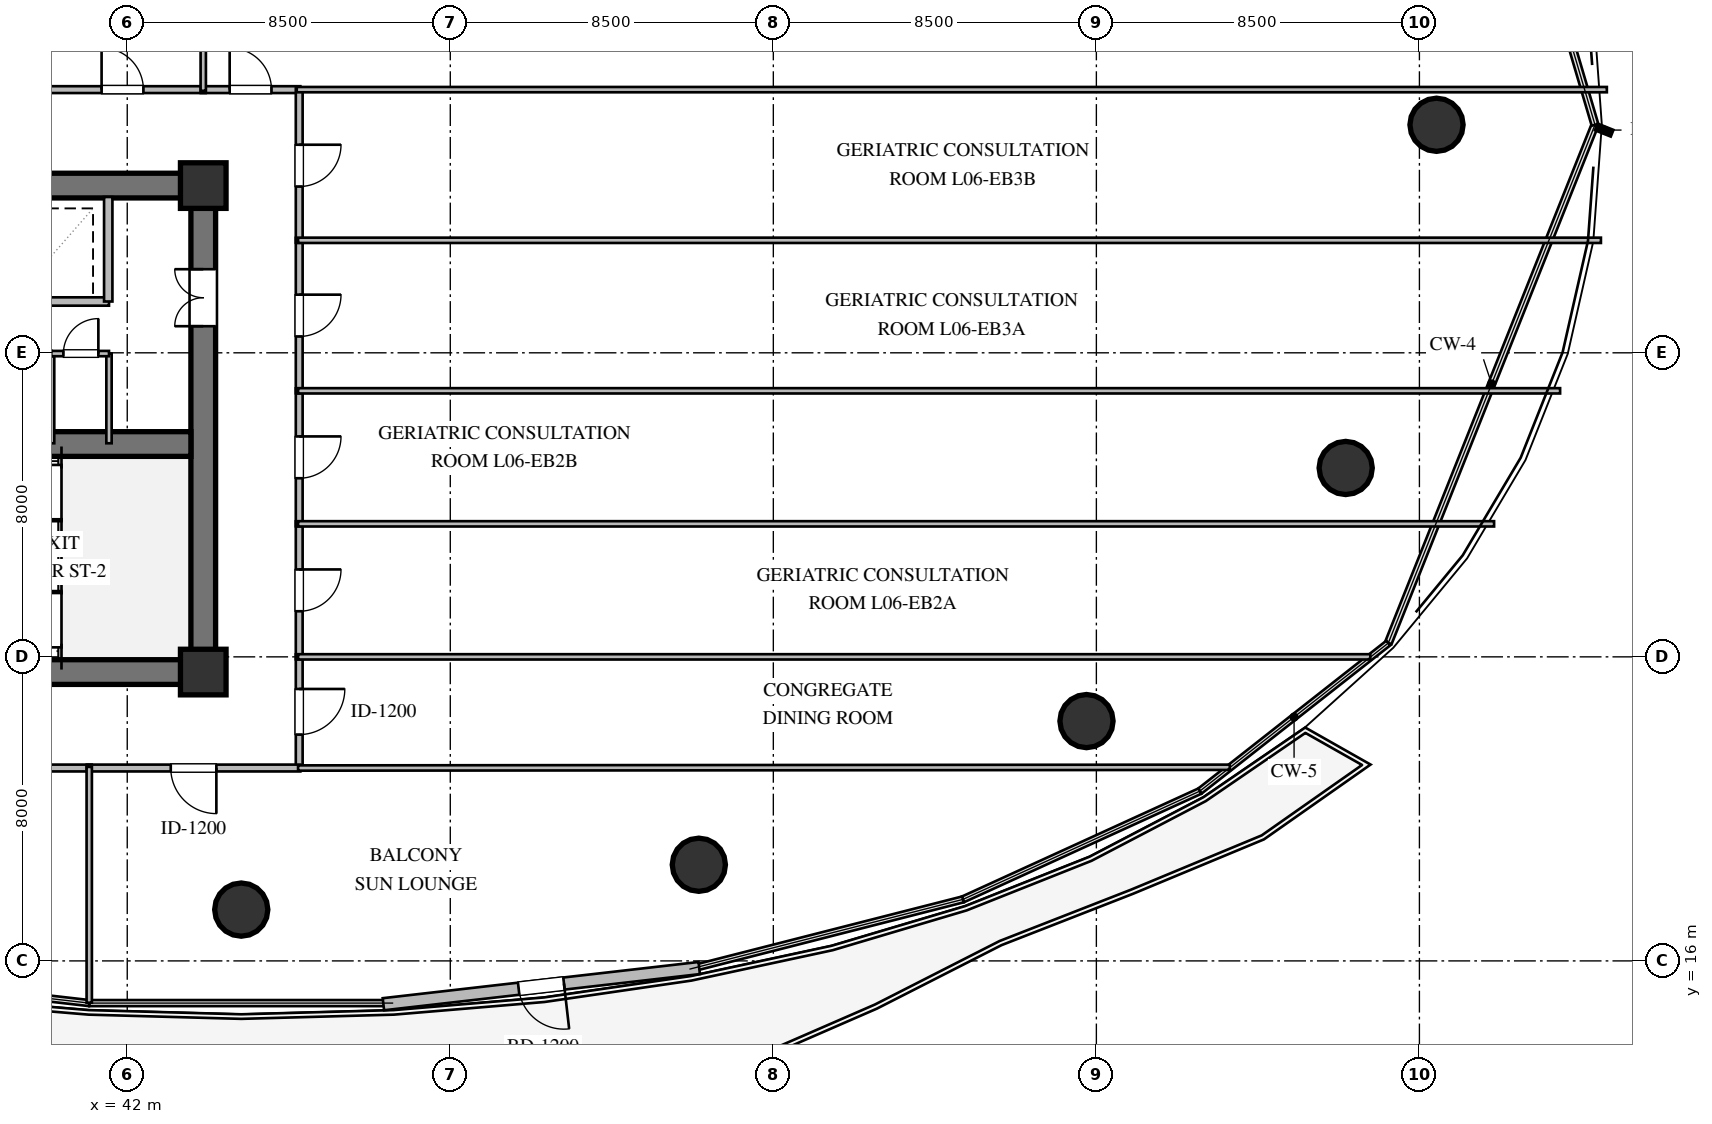
"""IFC4 building model, lengths in metres.
Left out: names, types, materials, properties, quantities, classifications, styles, units other than length and angle.
Written with IfcOpenShell. Run it as: python <this file> out.ifc"""

import sys

from ifc_helpers import new_model, si_unit, direction, frame, frame_2d, origin, origin_2d, place, context, subcontext, project, spatial, rectangle, circle, extrude, element, fill, save


model = new_model("IFC4")
c1 = context("Model", 3, precision=1e-05, world=origin(), true_north=direction((0.0, 1.0)))
c2 = subcontext(c1, "Body", "Model", "MODEL_VIEW")
j1 = project(units=[si_unit("LENGTHUNIT", "METRE"), si_unit("PLANEANGLEUNIT", "RADIAN")], contexts=[c1])
p1 = place(None, origin())
s1 = spatial("IfcSite", under=j1, at=p1, CompositionType="ELEMENT")
p2 = place(p1, origin())
s2 = spatial("IfcBuilding", under=s1, at=p2, CompositionType="ELEMENT")
p3 = place(p2, frame((0.0, 0.0, 27.6)))
s3 = spatial("IfcBuildingStorey", under=s2, at=p3, CompositionType="ELEMENT", Elevation=27.6)
for number, where, z_axis, x_axis in (
    (1, (21.675, 23.6, 0.0), (0.0, 0.0, 1.0), (1.0, 0.0, 0.0)),
    (2, (21.675, 36.4, 0.0), (0.0, 0.0, 1.0), (1.0, 0.0, 0.0)),
):
    element("IfcWall", number, at=place(p3, frame(where, z_axis=z_axis, x_axis=x_axis)), inside=s3, PredefinedType="SHEAR", context=c2, shape_type="SweptSolid", body=[
        extrude(rectangle(XDim=22.65, YDim=0.65, at=frame_2d((11.325, 0.0))), origin(), (0.0, 0.0, 1.0), 3.36),
    ])
p4 = place(p3, frame((44.0, 23.925, 0.0), z_axis=(0.0, 0.0, 1.0), x_axis=(0.0, 1.0, 0.0)))
e3 = element("IfcWall", 3, at=p4, inside=s3, PredefinedType="SHEAR", context=c2, shape_type="SweptSolid", body=[
    extrude(rectangle(XDim=12.15, YDim=0.65, at=frame_2d((6.075, 0.0))), origin(), (0.0, 0.0, 1.0), 3.36),
])
p5 = place(p4, frame((8.775, 0.0, 0.0)))
e4 = element("IfcOpeningElement", 4, at=p5, cuts=e3, PredefinedType="OPENING", context=c2, shape_type="SweptSolid", body=[
    extrude(rectangle(XDim=1.5, YDim=2.15, at=frame_2d((0.75, 1.075))), frame((0.0, 0.335, 0.0), z_axis=(0.0, -1.0, 0.0), x_axis=(1.0, 0.0, 0.0)), (0.0, 0.0, 1.0), 0.67),
])
p6 = place(p3, frame((22.325, 29.6, 0.0), z_axis=(0.0, 0.0, 1.0), x_axis=(1.0, 0.0, 0.0)))
e5 = element("IfcWall", 5, at=p6, inside=s3, PredefinedType="SHEAR", context=c2, shape_type="SweptSolid", body=[
    extrude(rectangle(XDim=21.35, YDim=0.65, at=frame_2d((10.675, 0.0))), origin(), (0.0, 0.0, 1.0), 3.36),
])
p7 = place(p6, frame((12.125, 0.0, 0.0)))
e6 = element("IfcOpeningElement", 6, at=p7, cuts=e5, PredefinedType="OPENING", context=c2, shape_type="SweptSolid", body=[
    extrude(rectangle(XDim=1.15, YDim=2.1, at=frame_2d((0.575, 1.05))), frame((0.0, 0.335, 0.0), z_axis=(0.0, -1.0, 0.0), x_axis=(1.0, 0.0, 0.0)), (0.0, 0.0, 1.0), 0.67),
])
for number, where, z_axis, x_axis in (
    (7, (44.0, 23.6, 0.0), (0.0, 0.0, 1.0), (1.0, 0.0, 0.0)),
    (8, (44.0, 36.4, 0.0), (0.0, 0.0, 1.0), (1.0, 0.0, 0.0)),
):
    element("IfcColumn", number, at=place(p3, frame(where, z_axis=z_axis, x_axis=x_axis)), inside=s3, PredefinedType="COLUMN", context=c2, shape_type="SweptSolid", body=[
        extrude(rectangle(XDim=1.2, YDim=1.2, at=origin_2d()), origin(), (0.0, 0.0, 1.0), 3.6),
    ])
for number, where, z_axis, x_axis in (
    (9, (76.45, 38.0, 0.0), (0.0, 0.0, 1.0), (1.0, 0.0, 0.0)),
    (10, (45.0, 17.35, 0.0), (0.0, 0.0, 1.0), (1.0, 0.0, 0.0)),
    (11, (57.04, 18.53, 0.0), (0.0, 0.0, 1.0), (1.0, 0.0, 0.0)),
    (12, (67.24, 22.31, 0.0), (0.0, 0.0, 1.0), (1.0, 0.0, 0.0)),
    (13, (74.06, 28.97, 0.0), (0.0, 0.0, 1.0), (1.0, 0.0, 0.0)),
):
    element("IfcColumn", number, at=place(p3, frame(where, z_axis=z_axis, x_axis=x_axis)), inside=s3, PredefinedType="COLUMN", context=c2, shape_type="SweptSolid", body=[
        extrude(circle(Radius=0.7, at=origin_2d()), origin(), (0.0, 0.0, 1.0), 3.6),
    ])
p8 = place(p3, frame((57.05, 15.812, 0.0), z_axis=(0.0, 0.0, 1.0), x_axis=(-0.993503192468, -0.113804246649, 0.0)))
e14 = element("IfcWall", 14, at=p8, inside=s3, PredefinedType="STANDARD", context=c2, shape_type="SweptSolid", body=[
    extrude(rectangle(XDim=8.365, YDim=0.32, at=frame_2d((4.182, 0.0))), origin(), (0.0, 0.0, 1.0), 3.36),
])
p9 = place(p8, frame((3.582, 0.0, 0.0)))
e15 = element("IfcOpeningElement", 15, at=p9, cuts=e14, PredefinedType="OPENING", context=c2, shape_type="SweptSolid", body=[
    extrude(rectangle(XDim=1.2, YDim=2.15, at=frame_2d((0.6, 1.075))), frame((0.0, 0.17, 0.0), z_axis=(0.0, -1.0, 0.0), x_axis=(1.0, 0.0, 0.0)), (0.0, 0.0, 1.0), 0.34),
])
p10 = place(p3, frame((33.98, 33.35, 0.0), z_axis=(0.0, 0.0, 1.0), x_axis=(1.0, 0.0, 0.0)))
e16 = element("IfcWall", 16, at=p10, inside=s3, PredefinedType="SOLIDWALL", context=c2, shape_type="SweptSolid", body=[
    extrude(rectangle(XDim=7.54, YDim=0.22, at=frame_2d((3.77, 0.0))), origin(), (0.0, 0.0, 1.0), 3.36),
])
p11 = place(p3, frame((41.5, 33.35, 0.0), z_axis=(0.0, 0.0, 1.0), x_axis=(0.0, 1.0, 0.0)))
e17 = element("IfcWall", 17, at=p11, inside=s3, PredefinedType="SOLIDWALL", context=c2, shape_type="SweptSolid", body=[
    extrude(rectangle(XDim=2.75, YDim=0.22, at=frame_2d((1.375, 0.0))), origin(), (0.0, 0.0, 1.0), 3.36),
])
p12 = place(p3, frame((40.0, 29.62, 0.0), z_axis=(0.0, 0.0, 1.0), x_axis=(0.0, 1.0, 0.0)))
e18 = element("IfcWall", 18, at=p12, inside=s3, PredefinedType="PLUMBINGWALL", context=c2, shape_type="SweptSolid", body=[
    extrude(rectangle(XDim=2.36, YDim=0.16, at=frame_2d((1.18, 0.0))), origin(), (0.0, 0.0, 1.0), 3.36),
])
p13 = place(p3, frame((41.52, 29.62, 0.0), z_axis=(0.0, 0.0, 1.0), x_axis=(0.0, 1.0, 0.0)))
e19 = element("IfcWall", 19, at=p13, inside=s3, PredefinedType="PARTITIONING", context=c2, shape_type="SweptSolid", body=[
    extrude(rectangle(XDim=2.36, YDim=0.14, at=frame_2d((1.18, 0.0))), origin(), (0.0, 0.0, 1.0), 3.36),
])
p14 = place(p3, frame((40.0, 31.98, 0.0), z_axis=(0.0, 0.0, 1.0), x_axis=(1.0, 0.0, 0.0)))
e20 = element("IfcWall", 20, at=p14, inside=s3, PredefinedType="PARTITIONING", context=c2, shape_type="SweptSolid", body=[
    extrude(rectangle(XDim=1.52, YDim=0.14, at=frame_2d((0.76, 0.0))), origin(), (0.0, 0.0, 1.0), 3.36),
])
p15 = place(p14, frame((0.32, 0.0, 0.0)))
e21 = element("IfcOpeningElement", 21, at=p15, cuts=e20, PredefinedType="OPENING", context=c2, shape_type="SweptSolid", body=[
    extrude(rectangle(XDim=0.92, YDim=2.1, at=frame_2d((0.46, 1.05))), frame((0.0, 0.08, 0.0), z_axis=(0.0, -1.0, 0.0), x_axis=(1.0, 0.0, 0.0)), (0.0, 0.0, 1.0), 0.16),
])
p16 = place(p3, frame((39.685, 38.925, 0.0), z_axis=(0.0, 0.0, 1.0), x_axis=(1.0, 0.0, 0.0)))
e22 = element("IfcWall", 22, at=p16, inside=s3, PredefinedType="PARTITIONING", context=c2, shape_type="SweptSolid", body=[
    extrude(rectangle(XDim=4.38, YDim=0.18, at=frame_2d((2.19, 0.0))), origin(), (0.0, 0.0, 1.0), 3.36),
])
p17 = place(p16, frame((1.64, 0.0, 0.0)))
e23 = element("IfcOpeningElement", 23, at=p17, cuts=e22, PredefinedType="OPENING", context=c2, shape_type="SweptSolid", body=[
    extrude(rectangle(XDim=1.1, YDim=2.1, at=frame_2d((0.55, 1.05))), frame((0.0, 0.1, 0.0), z_axis=(0.0, -1.0, 0.0), x_axis=(1.0, 0.0, 0.0)), (0.0, 0.0, 1.0), 0.2),
])
p18 = place(p3, frame((43.935, 38.925, 0.0), z_axis=(0.0, 0.0, 1.0), x_axis=(1.0, 0.0, 0.0)))
e24 = element("IfcWall", 24, at=p18, inside=s3, PredefinedType="PARTITIONING", context=c2, shape_type="SweptSolid", body=[
    extrude(rectangle(XDim=2.62, YDim=0.18, at=frame_2d((1.31, 0.0))), origin(), (0.0, 0.0, 1.0), 3.36),
])
p19 = place(p18, frame((0.76, 0.0, 0.0)))
e25 = element("IfcOpeningElement", 25, at=p19, cuts=e24, PredefinedType="OPENING", context=c2, shape_type="SweptSolid", body=[
    extrude(rectangle(XDim=1.1, YDim=2.1, at=frame_2d((0.55, 1.05))), frame((0.0, 0.1, 0.0), z_axis=(0.0, -1.0, 0.0), x_axis=(1.0, 0.0, 0.0)), (0.0, 0.0, 1.0), 0.2),
])
p20 = place(p3, frame((46.525, 24.065, 0.0), z_axis=(0.0, 0.0, 1.0), x_axis=(0.0, -1.0, 0.0)))
e26 = element("IfcWall", 26, at=p20, inside=s3, PredefinedType="PARTITIONING", context=c2, shape_type="SweptSolid", body=[
    extrude(rectangle(XDim=3.02, YDim=0.18, at=frame_2d((1.51, 0.0))), origin(), (0.0, 0.0, 1.0), 3.36),
])
p21 = place(p20, frame((0.91, 0.0, 0.0)))
e27 = element("IfcOpeningElement", 27, at=p21, cuts=e26, PredefinedType="OPENING", context=c2, shape_type="SweptSolid", body=[
    extrude(rectangle(XDim=1.2, YDim=2.15, at=frame_2d((0.6, 1.075))), frame((0.0, 0.1, 0.0), z_axis=(0.0, -1.0, 0.0), x_axis=(1.0, 0.0, 0.0)), (0.0, 0.0, 1.0), 0.2),
])
p22 = place(p3, frame((46.525, 27.565, 0.0), z_axis=(0.0, 0.0, 1.0), x_axis=(0.0, -1.0, 0.0)))
e28 = element("IfcWall", 28, at=p22, inside=s3, PredefinedType="PARTITIONING", context=c2, shape_type="SweptSolid", body=[
    extrude(rectangle(XDim=3.63, YDim=0.18, at=frame_2d((1.815, 0.0))), origin(), (0.0, 0.0, 1.0), 3.36),
])
p23 = place(p22, frame((1.265, 0.0, 0.0)))
e29 = element("IfcOpeningElement", 29, at=p23, cuts=e28, PredefinedType="OPENING", context=c2, shape_type="SweptSolid", body=[
    extrude(rectangle(XDim=1.1, YDim=2.1, at=frame_2d((0.55, 1.05))), frame((0.0, 0.1, 0.0), z_axis=(0.0, -1.0, 0.0), x_axis=(1.0, 0.0, 0.0)), (0.0, 0.0, 1.0), 0.2),
])
p24 = place(p3, frame((46.525, 31.065, 0.0), z_axis=(0.0, 0.0, 1.0), x_axis=(0.0, -1.0, 0.0)))
e30 = element("IfcWall", 30, at=p24, inside=s3, PredefinedType="PARTITIONING", context=c2, shape_type="SweptSolid", body=[
    extrude(rectangle(XDim=3.63, YDim=0.18, at=frame_2d((1.815, 0.0))), origin(), (0.0, 0.0, 1.0), 3.36),
])
p25 = place(p24, frame((1.265, 0.0, 0.0)))
e31 = element("IfcOpeningElement", 31, at=p25, cuts=e30, PredefinedType="OPENING", context=c2, shape_type="SweptSolid", body=[
    extrude(rectangle(XDim=1.1, YDim=2.1, at=frame_2d((0.55, 1.05))), frame((0.0, 0.1, 0.0), z_axis=(0.0, -1.0, 0.0), x_axis=(1.0, 0.0, 0.0)), (0.0, 0.0, 1.0), 0.2),
])
p26 = place(p3, frame((46.525, 35.025, 0.0), z_axis=(0.0, 0.0, 1.0), x_axis=(0.0, -1.0, 0.0)))
e32 = element("IfcWall", 32, at=p26, inside=s3, PredefinedType="PARTITIONING", context=c2, shape_type="SweptSolid", body=[
    extrude(rectangle(XDim=4.09, YDim=0.18, at=frame_2d((2.045, 0.0))), origin(), (0.0, 0.0, 1.0), 3.36),
])
p27 = place(p26, frame((1.495, 0.0, 0.0)))
e33 = element("IfcOpeningElement", 33, at=p27, cuts=e32, PredefinedType="OPENING", context=c2, shape_type="SweptSolid", body=[
    extrude(rectangle(XDim=1.1, YDim=2.1, at=frame_2d((0.55, 1.05))), frame((0.0, 0.1, 0.0), z_axis=(0.0, -1.0, 0.0), x_axis=(1.0, 0.0, 0.0)), (0.0, 0.0, 1.0), 0.2),
])
p28 = place(p3, frame((46.525, 38.955, 0.0), z_axis=(0.0, 0.0, 1.0), x_axis=(0.0, -1.0, 0.0)))
e34 = element("IfcWall", 34, at=p28, inside=s3, PredefinedType="PARTITIONING", context=c2, shape_type="SweptSolid", body=[
    extrude(rectangle(XDim=4.06, YDim=0.18, at=frame_2d((2.03, 0.0))), origin(), (0.0, 0.0, 1.0), 3.36),
])
p29 = place(p28, frame((1.48, 0.0, 0.0)))
e35 = element("IfcOpeningElement", 35, at=p29, cuts=e34, PredefinedType="OPENING", context=c2, shape_type="SweptSolid", body=[
    extrude(rectangle(XDim=1.1, YDim=2.1, at=frame_2d((0.55, 1.05))), frame((0.0, 0.1, 0.0), z_axis=(0.0, -1.0, 0.0), x_axis=(1.0, 0.0, 0.0)), (0.0, 0.0, 1.0), 0.2),
])
p30 = place(p3, frame((41.065, 21.075, 0.0), z_axis=(0.0, 0.0, 1.0), x_axis=(-1.0, 0.0, 0.0)))
e36 = element("IfcWall", 36, at=p30, inside=s3, PredefinedType="PARTITIONING", context=c2, shape_type="SweptSolid", body=[
    extrude(rectangle(XDim=7.13, YDim=0.18, at=frame_2d((3.565, 0.0))), origin(), (0.0, 0.0, 1.0), 2.996),
])
p31 = place(p30, frame((3.015, 0.0, 0.0)))
e37 = element("IfcOpeningElement", 37, at=p31, cuts=e36, PredefinedType="OPENING", context=c2, shape_type="SweptSolid", body=[
    extrude(rectangle(XDim=1.1, YDim=2.1, at=frame_2d((0.55, 1.05))), frame((0.0, 0.1, 0.0), z_axis=(0.0, -1.0, 0.0), x_axis=(1.0, 0.0, 0.0)), (0.0, 0.0, 1.0), 0.2),
])
p32 = place(p3, frame((46.555, 21.075, 0.0), z_axis=(0.0, 0.0, 1.0), x_axis=(-1.0, 0.0, 0.0)))
e38 = element("IfcWall", 38, at=p32, inside=s3, PredefinedType="PARTITIONING", context=c2, shape_type="SweptSolid", body=[
    extrude(rectangle(XDim=5.62, YDim=0.18, at=frame_2d((2.81, 0.0))), origin(), (0.0, 0.0, 1.0), 3.36),
])
p33 = place(p32, frame((2.21, 0.0, 0.0)))
e39 = element("IfcOpeningElement", 39, at=p33, cuts=e38, PredefinedType="OPENING", context=c2, shape_type="SweptSolid", body=[
    extrude(rectangle(XDim=1.2, YDim=2.15, at=frame_2d((0.6, 1.075))), frame((0.0, 0.1, 0.0), z_axis=(0.0, -1.0, 0.0), x_axis=(1.0, 0.0, 0.0)), (0.0, 0.0, 1.0), 0.2),
])
p34 = place(p3, frame((44.0, 67.706, 0.0), z_axis=(0.0, 0.0, 1.0), x_axis=(0.0, -1.0, 0.0)))
e40 = element("IfcWall", 40, at=p34, inside=s3, PredefinedType="PARTITIONING", context=c2, shape_type="SweptSolid", body=[
    extrude(rectangle(XDim=28.811, YDim=0.14, at=frame_2d((14.406, 0.0))), origin(), (0.0, 0.0, 1.0), 2.806),
])
p35 = place(p3, frame((80.932, 38.925, 0.0), z_axis=(0.0, 0.0, 1.0), x_axis=(-1.0, 0.0, 0.0)))
e41 = element("IfcWall", 41, at=p35, inside=s3, PredefinedType="PARTITIONING", context=c2, shape_type="SweptSolid", body=[
    extrude(rectangle(XDim=34.472, YDim=0.14, at=frame_2d((17.236, 0.0))), origin(), (0.0, 0.0, 1.0), 3.36),
])
p36 = place(p3, frame((46.495, 24.0, 0.0), z_axis=(0.0, 0.0, 1.0), x_axis=(1.0, 0.0, 0.0)))
e42 = element("IfcWall", 42, at=p36, inside=s3, PredefinedType="PARTITIONING", context=c2, shape_type="SweptSolid", body=[
    extrude(rectangle(XDim=28.214, YDim=0.14, at=frame_2d((14.107, 0.0))), origin(), (0.0, 0.0, 1.0), 2.806),
])
p37 = place(p3, frame((71.011, 21.094, 0.0), z_axis=(0.0, 0.0, 1.0), x_axis=(-0.999999682646, -0.000796685534, 0.0)))
e43 = element("IfcWall", 43, at=p37, inside=s3, PredefinedType="PARTITIONING", context=c2, shape_type="SweptSolid", body=[
    extrude(rectangle(XDim=24.516, YDim=0.14, at=frame_2d((12.258, 0.0))), origin(), (0.0, 0.0, 1.0), 2.996),
])
p38 = place(p3, frame((46.495, 27.5, 0.0), z_axis=(0.0, 0.0, 1.0), x_axis=(1.0, 0.0, 0.0)))
e44 = element("IfcWall", 44, at=p38, inside=s3, PredefinedType="PARTITIONING", context=c2, shape_type="SweptSolid", body=[
    extrude(rectangle(XDim=31.47, YDim=0.14, at=frame_2d((15.735, 0.0))), origin(), (0.0, 0.0, 1.0), 2.806),
])
p39 = place(p3, frame((46.495, 31.0, 0.0), z_axis=(0.0, 0.0, 1.0), x_axis=(1.0, 0.0, 0.0)))
e45 = element("IfcWall", 45, at=p39, inside=s3, PredefinedType="PARTITIONING", context=c2, shape_type="SweptSolid", body=[
    extrude(rectangle(XDim=33.207, YDim=0.14, at=frame_2d((16.604, 0.0))), origin(), (0.0, 0.0, 1.0), 3.36),
])
p40 = place(p3, frame((46.495, 34.96, 0.0), z_axis=(0.0, 0.0, 1.0), x_axis=(1.0, 0.0, 0.0)))
e46 = element("IfcWall", 46, at=p40, inside=s3, PredefinedType="PARTITIONING", context=c2, shape_type="SweptSolid", body=[
    extrude(rectangle(XDim=34.281, YDim=0.14, at=frame_2d((17.14, 0.0))), origin(), (0.0, 0.0, 1.0), 3.36),
])
p41 = place(p3, frame((41.0, 21.105, 0.0), z_axis=(0.0, 0.0, 1.0), x_axis=(0.0, -1.0, 0.0)))
e47 = element("IfcWall", 47, at=p41, inside=s3, PredefinedType="PARTITIONING", context=c2, shape_type="SweptSolid", body=[
    extrude(rectangle(XDim=6.205, YDim=0.14, at=frame_2d((3.103, 0.0))), origin(), (0.0, 0.0, 1.0), 3.36),
])
p42 = place(p9, origin())
e48 = element("IfcDoor", 48, at=p42, inside=s3, OperationType="SINGLE_SWING_LEFT", PredefinedType="DOOR", context=c2, shape_type="SweptSolid", body=[
    extrude(rectangle(XDim=1.2, YDim=2.15, at=frame_2d((0.6, 1.075))), frame((0.0, 0.025, 0.0), z_axis=(0.0, -1.0, 0.0), x_axis=(1.0, 0.0, 0.0)), (0.0, 0.0, 1.0), 0.05),
])
fill(e15, e48)
p43 = place(p5, origin())
e49 = element("IfcDoor", 49, at=p43, inside=s3, OperationType="DOUBLE_DOOR_SINGLE_SWING", PredefinedType="DOOR", context=c2, shape_type="SweptSolid", body=[
    extrude(rectangle(XDim=1.5, YDim=2.15, at=frame_2d((0.75, 1.075))), frame((0.0, 0.025, 0.0), z_axis=(0.0, -1.0, 0.0), x_axis=(1.0, 0.0, 0.0)), (0.0, 0.0, 1.0), 0.05),
])
fill(e4, e49)
p44 = place(p15, origin())
e50 = element("IfcDoor", 50, at=p44, inside=s3, OperationType="SINGLE_SWING_RIGHT", PredefinedType="DOOR", context=c2, shape_type="SweptSolid", body=[
    extrude(rectangle(XDim=0.92, YDim=2.1, at=frame_2d((0.46, 1.05))), frame((0.0, 0.025, 0.0), z_axis=(0.0, -1.0, 0.0), x_axis=(1.0, 0.0, 0.0)), (0.0, 0.0, 1.0), 0.05),
])
fill(e21, e50)
p45 = place(p17, origin())
e51 = element("IfcDoor", 51, at=p45, inside=s3, OperationType="SINGLE_SWING_LEFT", PredefinedType="DOOR", context=c2, shape_type="SweptSolid", body=[
    extrude(rectangle(XDim=1.1, YDim=2.1, at=frame_2d((0.55, 1.05))), frame((0.0, 0.025, 0.0), z_axis=(0.0, -1.0, 0.0), x_axis=(1.0, 0.0, 0.0)), (0.0, 0.0, 1.0), 0.05),
])
fill(e23, e51)
p46 = place(p19, origin())
e52 = element("IfcDoor", 52, at=p46, inside=s3, OperationType="SINGLE_SWING_LEFT", PredefinedType="DOOR", context=c2, shape_type="SweptSolid", body=[
    extrude(rectangle(XDim=1.1, YDim=2.1, at=frame_2d((0.55, 1.05))), frame((0.0, 0.025, 0.0), z_axis=(0.0, -1.0, 0.0), x_axis=(1.0, 0.0, 0.0)), (0.0, 0.0, 1.0), 0.05),
])
fill(e25, e52)
p47 = place(p21, origin())
e53 = element("IfcDoor", 53, at=p47, inside=s3, OperationType="SINGLE_SWING_LEFT", PredefinedType="DOOR", context=c2, shape_type="SweptSolid", body=[
    extrude(rectangle(XDim=1.2, YDim=2.15, at=frame_2d((0.6, 1.075))), frame((0.0, 0.025, 0.0), z_axis=(0.0, -1.0, 0.0), x_axis=(1.0, 0.0, 0.0)), (0.0, 0.0, 1.0), 0.05),
])
fill(e27, e53)
p48 = place(p23, origin())
e54 = element("IfcDoor", 54, at=p48, inside=s3, OperationType="SINGLE_SWING_LEFT", PredefinedType="DOOR", context=c2, shape_type="SweptSolid", body=[
    extrude(rectangle(XDim=1.1, YDim=2.1, at=frame_2d((0.55, 1.05))), frame((0.0, 0.025, 0.0), z_axis=(0.0, -1.0, 0.0), x_axis=(1.0, 0.0, 0.0)), (0.0, 0.0, 1.0), 0.05),
])
fill(e29, e54)
p49 = place(p25, origin())
e55 = element("IfcDoor", 55, at=p49, inside=s3, OperationType="SINGLE_SWING_LEFT", PredefinedType="DOOR", context=c2, shape_type="SweptSolid", body=[
    extrude(rectangle(XDim=1.1, YDim=2.1, at=frame_2d((0.55, 1.05))), frame((0.0, 0.025, 0.0), z_axis=(0.0, -1.0, 0.0), x_axis=(1.0, 0.0, 0.0)), (0.0, 0.0, 1.0), 0.05),
])
fill(e31, e55)
p50 = place(p27, origin())
e56 = element("IfcDoor", 56, at=p50, inside=s3, OperationType="SINGLE_SWING_LEFT", PredefinedType="DOOR", context=c2, shape_type="SweptSolid", body=[
    extrude(rectangle(XDim=1.1, YDim=2.1, at=frame_2d((0.55, 1.05))), frame((0.0, 0.025, 0.0), z_axis=(0.0, -1.0, 0.0), x_axis=(1.0, 0.0, 0.0)), (0.0, 0.0, 1.0), 0.05),
])
fill(e33, e56)
p51 = place(p29, origin())
e57 = element("IfcDoor", 57, at=p51, inside=s3, OperationType="SINGLE_SWING_LEFT", PredefinedType="DOOR", context=c2, shape_type="SweptSolid", body=[
    extrude(rectangle(XDim=1.1, YDim=2.1, at=frame_2d((0.55, 1.05))), frame((0.0, 0.025, 0.0), z_axis=(0.0, -1.0, 0.0), x_axis=(1.0, 0.0, 0.0)), (0.0, 0.0, 1.0), 0.05),
])
fill(e35, e57)
p52 = place(p33, origin())
e58 = element("IfcDoor", 58, at=p52, inside=s3, OperationType="SINGLE_SWING_LEFT", PredefinedType="DOOR", context=c2, shape_type="SweptSolid", body=[
    extrude(rectangle(XDim=1.2, YDim=2.15, at=frame_2d((0.6, 1.075))), frame((0.0, 0.025, 0.0), z_axis=(0.0, -1.0, 0.0), x_axis=(1.0, 0.0, 0.0)), (0.0, 0.0, 1.0), 0.05),
])
fill(e39, e58)
save(model, sys.argv[1])
